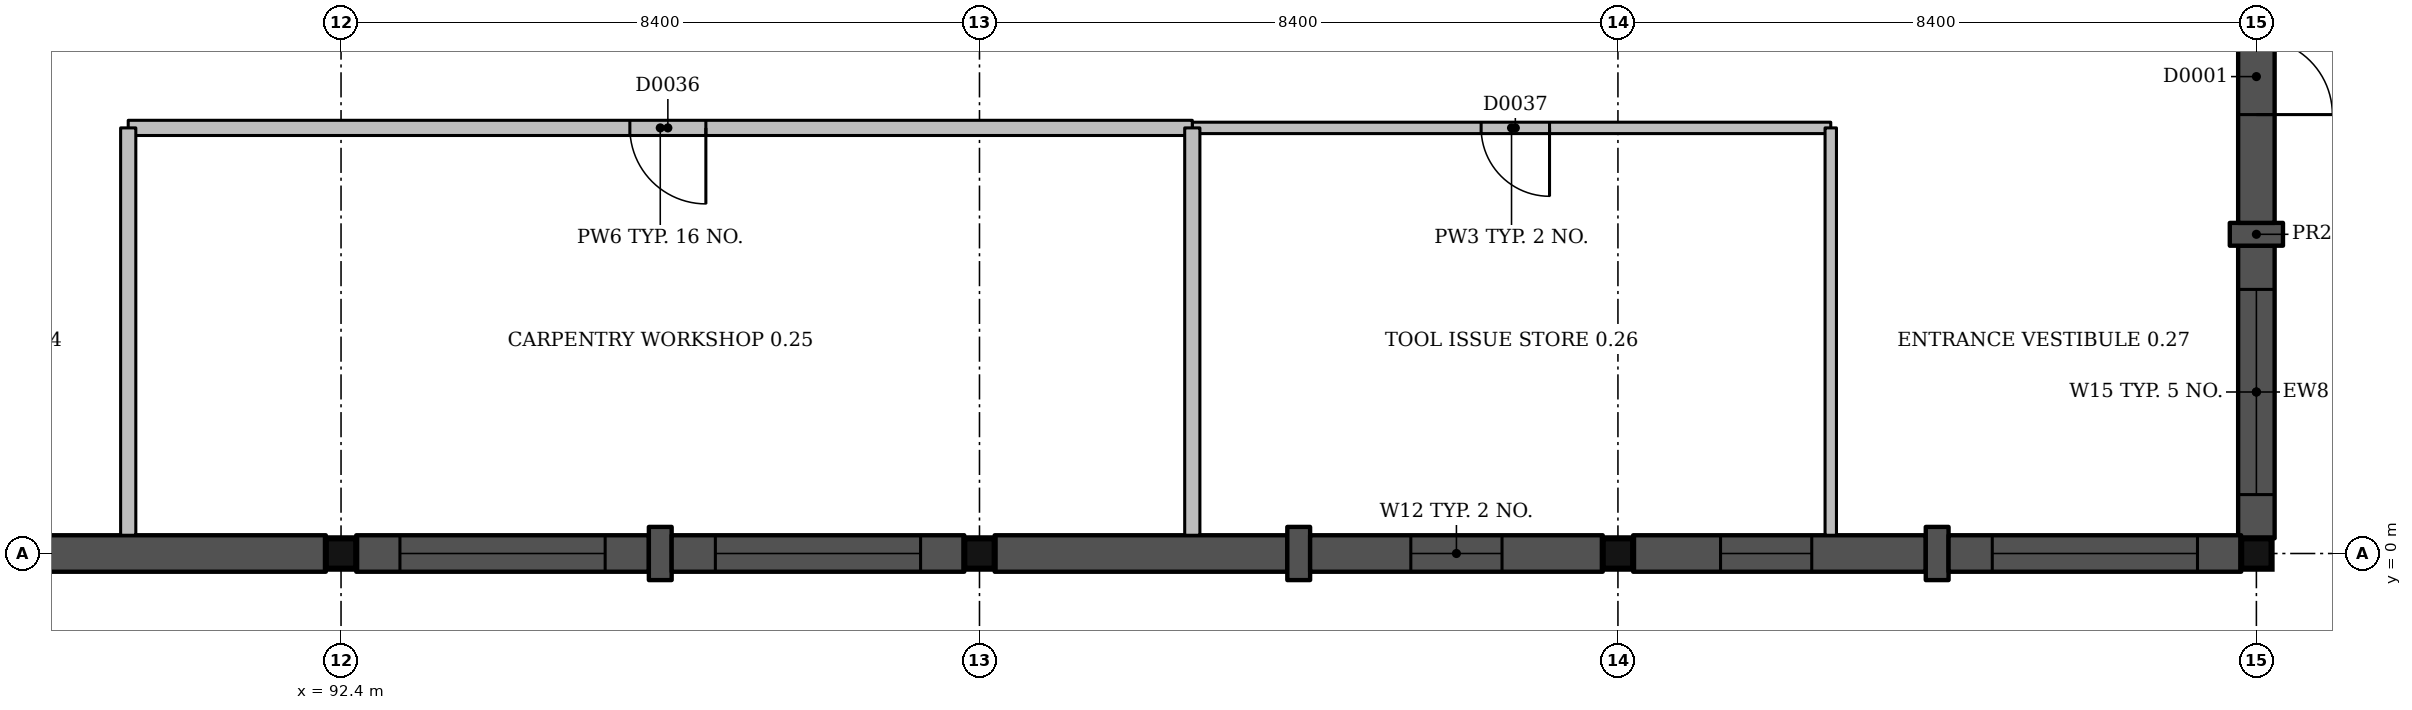
"""IFC4 building model, lengths in metres.
Left out: names, types, materials, properties, quantities, classifications, styles, units other than length and angle.
Written with IfcOpenShell. Run it as: python <this file> out.ifc"""

import sys

from ifc_helpers import new_model, si_unit, direction, frame, frame_2d, origin, origin_2d, place, context, subcontext, project, spatial, rectangle, extrude, element, fill, save


model = new_model("IFC4")
c1 = context("Model", 3, precision=1e-05, world=origin(), true_north=direction((0.0, 1.0)))
c2 = subcontext(c1, "Body", "Model", "MODEL_VIEW")
j1 = project(units=[si_unit("LENGTHUNIT", "METRE"), si_unit("PLANEANGLEUNIT", "RADIAN")], contexts=[c1])
p1 = place(None, origin())
s1 = spatial("IfcSite", under=j1, at=p1, CompositionType="ELEMENT")
p2 = place(p1, origin())
s2 = spatial("IfcBuilding", under=s1, at=p2, CompositionType="ELEMENT")
p3 = place(p2, origin())
s3 = spatial("IfcBuildingStorey", under=s2, at=p3, CompositionType="ELEMENT", Elevation=0.0)
for number, where, z_axis, x_axis in (
    (1, (92.4, 0.0, -1.5), (0.0, 0.0, 1.0), (1.0, 0.0, 0.0)),
    (2, (100.8, 0.0, -1.5), (0.0, 0.0, 1.0), (1.0, 0.0, 0.0)),
    (3, (109.2, 0.0, -1.5), (0.0, 0.0, 1.0), (1.0, 0.0, 0.0)),
    (4, (117.6, 0.0, -1.5), (0.0, 0.0, 1.0), (1.0, 0.0, 0.0)),
):
    element("IfcColumn", number, at=place(p3, frame(where, z_axis=z_axis, x_axis=x_axis)), inside=s3, PredefinedType="COLUMN", context=c2, shape_type="SweptSolid", body=[
        extrude(rectangle(XDim=0.4, YDim=0.4, at=origin_2d()), origin(), (0.0, 0.0, 1.0), 6.0),
    ])
p4 = place(p3, frame((117.6, 0.2, 0.0), z_axis=(0.0, 0.0, 1.0), x_axis=(0.0, 1.0, 0.0)))
e5 = element("IfcWall", 5, at=p4, inside=s3, PredefinedType="SOLIDWALL", context=c2, shape_type="SweptSolid", body=[
    extrude(rectangle(XDim=3.85, YDim=0.48, at=frame_2d((1.925, 0.0))), origin(), (0.0, 0.0, 1.0), 3.45),
])
p5 = place(p4, frame((0.575, 0.0, 1.2)))
e6 = element("IfcOpeningElement", 6, at=p5, cuts=e5, PredefinedType="OPENING", context=c2, shape_type="SweptSolid", body=[
    extrude(rectangle(XDim=2.7, YDim=1.8, at=frame_2d((1.35, 0.9))), frame((0.0, 0.25, 0.0), z_axis=(0.0, -1.0, 0.0), x_axis=(1.0, 0.0, 0.0)), (0.0, 0.0, 1.0), 0.5),
])
p6 = place(p3, frame((117.6, 4.05, 0.0), z_axis=(0.0, 0.0, 1.0), x_axis=(0.0, 1.0, 0.0)))
e7 = element("IfcWall", 7, at=p6, inside=s3, PredefinedType="SOLIDWALL", context=c2, shape_type="SweptSolid", body=[
    extrude(rectangle(XDim=0.3, YDim=0.7, at=frame_2d((0.15, 0.0))), origin(), (0.0, 0.0, 1.0), 3.45),
])
p7 = place(p3, frame((117.6, 4.35, 0.0), z_axis=(0.0, 0.0, 1.0), x_axis=(0.0, 1.0, 0.0)))
e8 = element("IfcWall", 8, at=p7, inside=s3, PredefinedType="SOLIDWALL", context=c2, shape_type="SweptSolid", body=[
    extrude(rectangle(XDim=3.85, YDim=0.48, at=frame_2d((1.925, 0.0))), origin(), (0.0, 0.0, 1.0), 3.45),
])
p8 = place(p7, frame((2.425, 0.0, 0.0), z_axis=(0.0, 0.0, 1.0), x_axis=(-1.0, 0.0, 0.0)))
e9 = element("IfcOpeningElement", 9, at=p8, cuts=e8, PredefinedType="OPENING", context=c2, shape_type="SweptSolid", body=[
    extrude(rectangle(XDim=1.0, YDim=2.1, at=frame_2d((0.5, 1.05))), frame((0.0, 0.25, 0.0), z_axis=(0.0, -1.0, 0.0), x_axis=(1.0, 0.0, 0.0)), (0.0, 0.0, 1.0), 0.5),
])
p9 = place(p3, frame((88.35, 0.0, 0.0), z_axis=(0.0, 0.0, 1.0), x_axis=(1.0, 0.0, 0.0)))
e10 = element("IfcWall", 10, at=p9, inside=s3, PredefinedType="SOLIDWALL", context=c2, shape_type="SweptSolid", body=[
    extrude(rectangle(XDim=3.85, YDim=0.48, at=frame_2d((1.925, 0.0))), origin(), (0.0, 0.0, 1.0), 3.45),
])
p10 = place(p3, frame((92.6, 0.0, 0.0), z_axis=(0.0, 0.0, 1.0), x_axis=(1.0, 0.0, 0.0)))
e11 = element("IfcWall", 11, at=p10, inside=s3, PredefinedType="SOLIDWALL", context=c2, shape_type="SweptSolid", body=[
    extrude(rectangle(XDim=3.85, YDim=0.48, at=frame_2d((1.925, 0.0))), origin(), (0.0, 0.0, 1.0), 3.45),
])
p11 = place(p10, frame((0.575, 0.0, 1.2)))
e12 = element("IfcOpeningElement", 12, at=p11, cuts=e11, PredefinedType="OPENING", context=c2, shape_type="SweptSolid", body=[
    extrude(rectangle(XDim=2.7, YDim=1.8, at=frame_2d((1.35, 0.9))), frame((0.0, 0.25, 0.0), z_axis=(0.0, -1.0, 0.0), x_axis=(1.0, 0.0, 0.0)), (0.0, 0.0, 1.0), 0.5),
])
p12 = place(p3, frame((96.45, 0.0, 0.0), z_axis=(0.0, 0.0, 1.0), x_axis=(1.0, 0.0, 0.0)))
e13 = element("IfcWall", 13, at=p12, inside=s3, PredefinedType="SOLIDWALL", context=c2, shape_type="SweptSolid", body=[
    extrude(rectangle(XDim=0.3, YDim=0.7, at=frame_2d((0.15, 0.0))), origin(), (0.0, 0.0, 1.0), 3.45),
])
p13 = place(p3, frame((96.75, 0.0, 0.0), z_axis=(0.0, 0.0, 1.0), x_axis=(1.0, 0.0, 0.0)))
e14 = element("IfcWall", 14, at=p13, inside=s3, PredefinedType="SOLIDWALL", context=c2, shape_type="SweptSolid", body=[
    extrude(rectangle(XDim=3.85, YDim=0.48, at=frame_2d((1.925, 0.0))), origin(), (0.0, 0.0, 1.0), 3.45),
])
p14 = place(p13, frame((0.575, 0.0, 1.2)))
e15 = element("IfcOpeningElement", 15, at=p14, cuts=e14, PredefinedType="OPENING", context=c2, shape_type="SweptSolid", body=[
    extrude(rectangle(XDim=2.7, YDim=1.8, at=frame_2d((1.35, 0.9))), frame((0.0, 0.25, 0.0), z_axis=(0.0, -1.0, 0.0), x_axis=(1.0, 0.0, 0.0)), (0.0, 0.0, 1.0), 0.5),
])
p15 = place(p3, frame((101.0, 0.0, 0.0), z_axis=(0.0, 0.0, 1.0), x_axis=(1.0, 0.0, 0.0)))
e16 = element("IfcWall", 16, at=p15, inside=s3, PredefinedType="SOLIDWALL", context=c2, shape_type="SweptSolid", body=[
    extrude(rectangle(XDim=3.85, YDim=0.48, at=frame_2d((1.925, 0.0))), origin(), (0.0, 0.0, 1.0), 3.45),
])
p16 = place(p3, frame((104.85, 0.0, 0.0), z_axis=(0.0, 0.0, 1.0), x_axis=(1.0, 0.0, 0.0)))
e17 = element("IfcWall", 17, at=p16, inside=s3, PredefinedType="SOLIDWALL", context=c2, shape_type="SweptSolid", body=[
    extrude(rectangle(XDim=0.3, YDim=0.7, at=frame_2d((0.15, 0.0))), origin(), (0.0, 0.0, 1.0), 3.45),
])
p17 = place(p3, frame((105.15, 0.0, 0.0), z_axis=(0.0, 0.0, 1.0), x_axis=(1.0, 0.0, 0.0)))
e18 = element("IfcWall", 18, at=p17, inside=s3, PredefinedType="SOLIDWALL", context=c2, shape_type="SweptSolid", body=[
    extrude(rectangle(XDim=3.85, YDim=0.48, at=frame_2d((1.925, 0.0))), origin(), (0.0, 0.0, 1.0), 3.45),
])
p18 = place(p17, frame((1.325, 0.0, 2.4)))
e19 = element("IfcOpeningElement", 19, at=p18, cuts=e18, PredefinedType="OPENING", context=c2, shape_type="SweptSolid", body=[
    extrude(rectangle(XDim=1.2, YDim=0.6, at=frame_2d((0.6, 0.3))), frame((0.0, 0.25, 0.0), z_axis=(0.0, -1.0, 0.0), x_axis=(1.0, 0.0, 0.0)), (0.0, 0.0, 1.0), 0.5),
])
p19 = place(p3, frame((109.4, 0.0, 0.0), z_axis=(0.0, 0.0, 1.0), x_axis=(1.0, 0.0, 0.0)))
e20 = element("IfcWall", 20, at=p19, inside=s3, PredefinedType="SOLIDWALL", context=c2, shape_type="SweptSolid", body=[
    extrude(rectangle(XDim=3.85, YDim=0.48, at=frame_2d((1.925, 0.0))), origin(), (0.0, 0.0, 1.0), 3.45),
])
p20 = place(p19, frame((1.15, 0.0, 2.4)))
e21 = element("IfcOpeningElement", 21, at=p20, cuts=e20, PredefinedType="OPENING", context=c2, shape_type="SweptSolid", body=[
    extrude(rectangle(XDim=1.2, YDim=0.6, at=frame_2d((0.6, 0.3))), frame((0.0, 0.25, 0.0), z_axis=(0.0, -1.0, 0.0), x_axis=(1.0, 0.0, 0.0)), (0.0, 0.0, 1.0), 0.5),
])
p21 = place(p3, frame((113.25, 0.0, 0.0), z_axis=(0.0, 0.0, 1.0), x_axis=(1.0, 0.0, 0.0)))
e22 = element("IfcWall", 22, at=p21, inside=s3, PredefinedType="SOLIDWALL", context=c2, shape_type="SweptSolid", body=[
    extrude(rectangle(XDim=0.3, YDim=0.7, at=frame_2d((0.15, 0.0))), origin(), (0.0, 0.0, 1.0), 3.45),
])
p22 = place(p3, frame((113.55, 0.0, 0.0), z_axis=(0.0, 0.0, 1.0), x_axis=(1.0, 0.0, 0.0)))
e23 = element("IfcWall", 23, at=p22, inside=s3, PredefinedType="SOLIDWALL", context=c2, shape_type="SweptSolid", body=[
    extrude(rectangle(XDim=3.85, YDim=0.48, at=frame_2d((1.925, 0.0))), origin(), (0.0, 0.0, 1.0), 3.45),
])
p23 = place(p22, frame((0.575, 0.0, 1.2)))
e24 = element("IfcOpeningElement", 24, at=p23, cuts=e23, PredefinedType="OPENING", context=c2, shape_type="SweptSolid", body=[
    extrude(rectangle(XDim=2.7, YDim=1.8, at=frame_2d((1.35, 0.9))), frame((0.0, 0.25, 0.0), z_axis=(0.0, -1.0, 0.0), x_axis=(1.0, 0.0, 0.0)), (0.0, 0.0, 1.0), 0.5),
])
p24 = place(p3, frame((103.6, 5.6, 0.0), z_axis=(0.0, 0.0, 1.0), x_axis=(1.0, 0.0, 0.0)))
e25 = element("IfcWall", 25, at=p24, inside=s3, PredefinedType="PARTITIONING", context=c2, shape_type="SweptSolid", body=[
    extrude(rectangle(XDim=8.4, YDim=0.15, at=frame_2d((4.2, 0.0))), origin(), (0.0, 0.0, 1.0), 3.5),
])
p25 = place(p24, frame((3.8, 0.0, 0.0)))
e26 = element("IfcOpeningElement", 26, at=p25, cuts=e25, PredefinedType="OPENING", context=c2, shape_type="SweptSolid", body=[
    extrude(rectangle(XDim=0.9, YDim=2.1, at=frame_2d((0.45, 1.05))), frame((0.0, 0.085, 0.0), z_axis=(0.0, -1.0, 0.0), x_axis=(1.0, 0.0, 0.0)), (0.0, 0.0, 1.0), 0.17),
])
p26 = place(p3, frame((89.6, 5.6, 0.0), z_axis=(0.0, 0.0, 1.0), x_axis=(1.0, 0.0, 0.0)))
e27 = element("IfcWall", 27, at=p26, inside=s3, PredefinedType="PARTITIONING", context=c2, shape_type="SweptSolid", body=[
    extrude(rectangle(XDim=14.0, YDim=0.2, at=frame_2d((7.0, 0.0))), origin(), (0.0, 0.0, 1.0), 3.5),
])
p27 = place(p26, frame((6.6, 0.0, 0.0)))
e28 = element("IfcOpeningElement", 28, at=p27, cuts=e27, PredefinedType="OPENING", context=c2, shape_type="SweptSolid", body=[
    extrude(rectangle(XDim=1.0, YDim=2.1, at=frame_2d((0.5, 1.05))), frame((0.0, 0.11, 0.0), z_axis=(0.0, -1.0, 0.0), x_axis=(1.0, 0.0, 0.0)), (0.0, 0.0, 1.0), 0.22),
])
for number, where, z_axis, x_axis in (
    (29, (89.6, 0.24, 0.0), (0.0, 0.0, 1.0), (0.0, 1.0, 0.0)),
    (30, (103.6, 0.24, 0.0), (0.0, 0.0, 1.0), (0.0, 1.0, 0.0)),
):
    element("IfcWall", number, at=place(p3, frame(where, z_axis=z_axis, x_axis=x_axis)), inside=s3, PredefinedType="PARTITIONING", context=c2, shape_type="SweptSolid", body=[
        extrude(rectangle(XDim=5.36, YDim=0.2, at=frame_2d((2.68, 0.0))), origin(), (0.0, 0.0, 1.0), 4.15),
    ])
p28 = place(p3, frame((112.0, 0.24, 0.0), z_axis=(0.0, 0.0, 1.0), x_axis=(0.0, 1.0, 0.0)))
e31 = element("IfcWall", 31, at=p28, inside=s3, PredefinedType="PARTITIONING", context=c2, shape_type="SweptSolid", body=[
    extrude(rectangle(XDim=5.36, YDim=0.15, at=frame_2d((2.68, 0.0))), origin(), (0.0, 0.0, 1.0), 4.15),
])
p29 = place(p5, origin())
e32 = element("IfcWindow", 32, at=p29, inside=s3, PartitioningType="SINGLE_PANEL", PredefinedType="WINDOW", context=c2, shape_type="SweptSolid", body=[
    extrude(rectangle(XDim=2.7, YDim=1.8, at=frame_2d((1.35, 0.9))), frame((0.0, 0.12, 0.0), z_axis=(0.0, -1.0, 0.0), x_axis=(1.0, 0.0, 0.0)), (0.0, 0.0, 1.0), 0.06),
])
fill(e6, e32)
p30 = place(p8, origin())
e33 = element("IfcDoor", 33, at=p30, inside=s3, OperationType="SINGLE_SWING_LEFT", PredefinedType="DOOR", context=c2, shape_type="SweptSolid", body=[
    extrude(rectangle(XDim=1.0, YDim=2.1, at=frame_2d((0.5, 1.05))), frame((0.0, 0.025, 0.0), z_axis=(0.0, -1.0, 0.0), x_axis=(1.0, 0.0, 0.0)), (0.0, 0.0, 1.0), 0.05),
])
fill(e9, e33)
p31 = place(p11, origin())
e34 = element("IfcWindow", 34, at=p31, inside=s3, PartitioningType="SINGLE_PANEL", PredefinedType="WINDOW", context=c2, shape_type="SweptSolid", body=[
    extrude(rectangle(XDim=2.7, YDim=1.8, at=frame_2d((1.35, 0.9))), frame((0.0, 0.12, 0.0), z_axis=(0.0, -1.0, 0.0), x_axis=(1.0, 0.0, 0.0)), (0.0, 0.0, 1.0), 0.06),
])
fill(e12, e34)
p32 = place(p14, origin())
e35 = element("IfcWindow", 35, at=p32, inside=s3, PartitioningType="SINGLE_PANEL", PredefinedType="WINDOW", context=c2, shape_type="SweptSolid", body=[
    extrude(rectangle(XDim=2.7, YDim=1.8, at=frame_2d((1.35, 0.9))), frame((0.0, 0.12, 0.0), z_axis=(0.0, -1.0, 0.0), x_axis=(1.0, 0.0, 0.0)), (0.0, 0.0, 1.0), 0.06),
])
fill(e15, e35)
p33 = place(p18, origin())
e36 = element("IfcWindow", 36, at=p33, inside=s3, PartitioningType="SINGLE_PANEL", PredefinedType="WINDOW", context=c2, shape_type="SweptSolid", body=[
    extrude(rectangle(XDim=1.2, YDim=0.6, at=frame_2d((0.6, 0.3))), frame((0.0, 0.12, 0.0), z_axis=(0.0, -1.0, 0.0), x_axis=(1.0, 0.0, 0.0)), (0.0, 0.0, 1.0), 0.06),
])
fill(e19, e36)
p34 = place(p20, origin())
e37 = element("IfcWindow", 37, at=p34, inside=s3, PartitioningType="SINGLE_PANEL", PredefinedType="WINDOW", context=c2, shape_type="SweptSolid", body=[
    extrude(rectangle(XDim=1.2, YDim=0.6, at=frame_2d((0.6, 0.3))), frame((0.0, 0.12, 0.0), z_axis=(0.0, -1.0, 0.0), x_axis=(1.0, 0.0, 0.0)), (0.0, 0.0, 1.0), 0.06),
])
fill(e21, e37)
p35 = place(p23, origin())
e38 = element("IfcWindow", 38, at=p35, inside=s3, PartitioningType="SINGLE_PANEL", PredefinedType="WINDOW", context=c2, shape_type="SweptSolid", body=[
    extrude(rectangle(XDim=2.7, YDim=1.8, at=frame_2d((1.35, 0.9))), frame((0.0, 0.12, 0.0), z_axis=(0.0, -1.0, 0.0), x_axis=(1.0, 0.0, 0.0)), (0.0, 0.0, 1.0), 0.06),
])
fill(e24, e38)
p36 = place(p27, origin())
e39 = element("IfcDoor", 39, at=p36, inside=s3, OperationType="SINGLE_SWING_RIGHT", PredefinedType="DOOR", context=c2, shape_type="SweptSolid", body=[
    extrude(rectangle(XDim=1.0, YDim=2.1, at=frame_2d((0.5, 1.05))), frame((0.0, 0.025, 0.0), z_axis=(0.0, -1.0, 0.0), x_axis=(1.0, 0.0, 0.0)), (0.0, 0.0, 1.0), 0.05),
])
fill(e28, e39)
p37 = place(p25, origin())
e40 = element("IfcDoor", 40, at=p37, inside=s3, OperationType="SINGLE_SWING_RIGHT", PredefinedType="DOOR", context=c2, shape_type="SweptSolid", body=[
    extrude(rectangle(XDim=0.9, YDim=2.1, at=frame_2d((0.45, 1.05))), frame((0.0, 0.025, 0.0), z_axis=(0.0, -1.0, 0.0), x_axis=(1.0, 0.0, 0.0)), (0.0, 0.0, 1.0), 0.05),
])
fill(e26, e40)
save(model, sys.argv[1])
